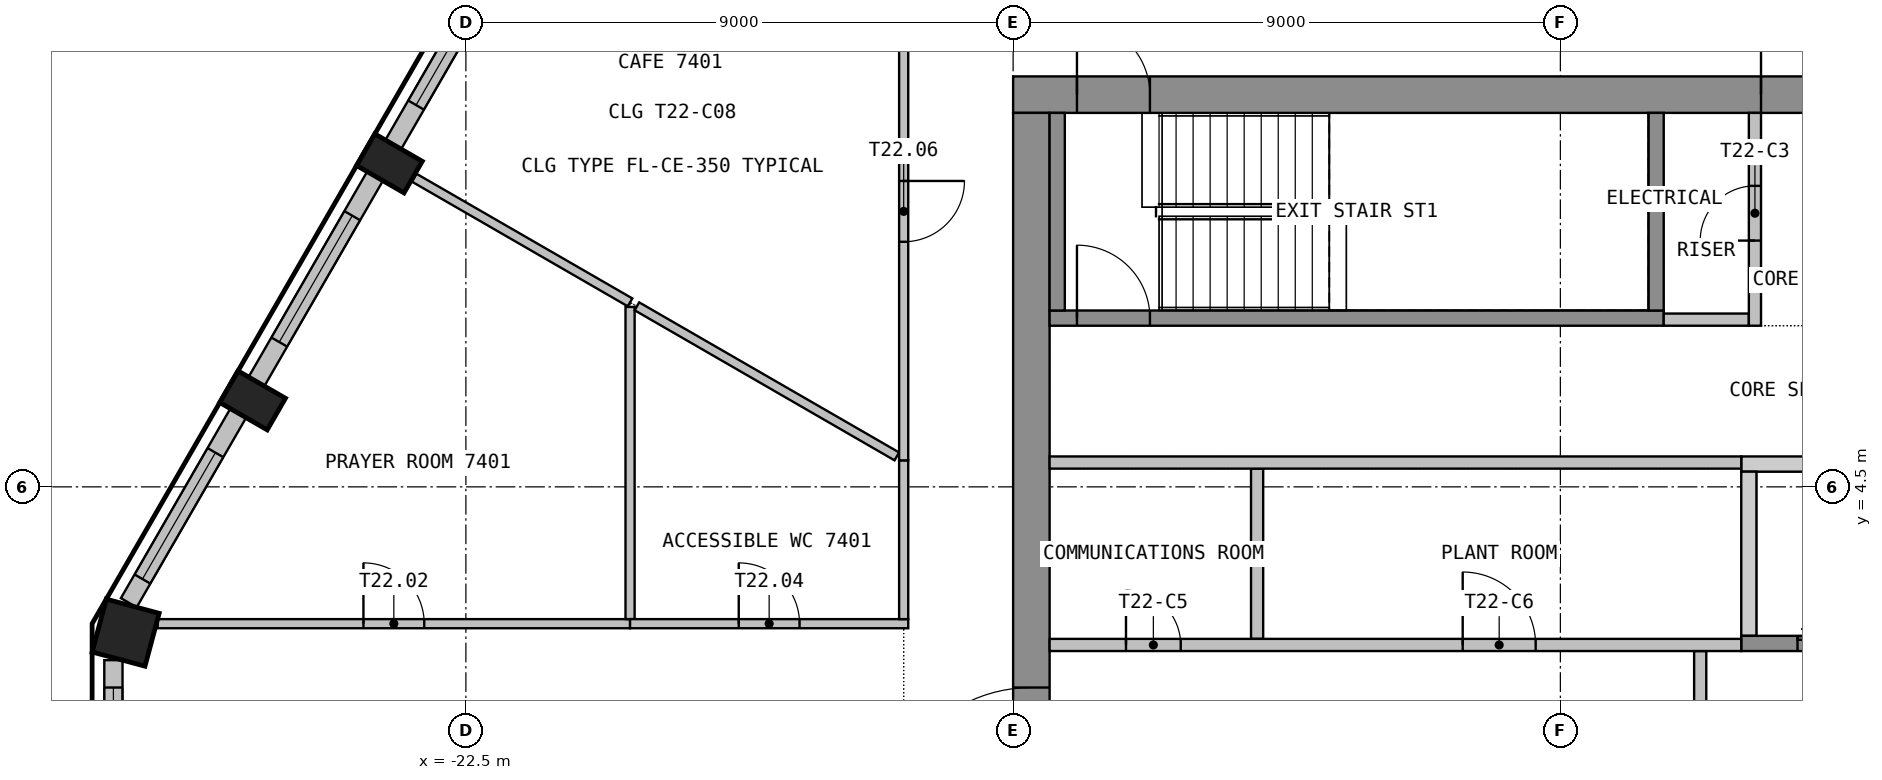
"""IFC4 building model, lengths in metres.
Left out: names, types, materials, properties, quantities, classifications, styles, units other than length and angle.
Written with IfcOpenShell. Run it as: python <this file> out.ifc"""

import sys

from ifc_helpers import new_model, si_unit, direction, frame, frame_2d, origin, origin_2d, place, context, subcontext, project, spatial, polyline, rectangle, outline, extrude, element, fill, save


model = new_model("IFC4")
c1 = context("Model", 3, precision=1e-05, world=origin(), true_north=direction((0.0, 1.0)))
c2 = subcontext(c1, "Body", "Model", "MODEL_VIEW")
j1 = project(units=[si_unit("LENGTHUNIT", "METRE"), si_unit("PLANEANGLEUNIT", "RADIAN")], contexts=[c1])
p1 = place(None, origin())
s1 = spatial("IfcSite", under=j1, at=p1, CompositionType="ELEMENT")
p2 = place(p1, origin())
s2 = spatial("IfcBuilding", under=s1, at=p2, CompositionType="ELEMENT")
p3 = place(p2, frame((0.0, 0.0, 298.2)))
s3 = spatial("IfcBuildingStorey", under=s2, at=p3, CompositionType="ELEMENT", Elevation=298.2)
for number, where, z_axis, x_axis in (
    (1, (-23.757, 9.819, 0.0), (0.0, 0.0, 1.0), (-0.5, -0.866, 0.0)),
    (2, (-26.007, 5.922, 0.0), (0.0, 0.0, 1.0), (-0.5, -0.866, 0.0)),
):
    element("IfcColumn", number, at=place(p3, frame(where, z_axis=z_axis, x_axis=x_axis)), inside=s3, PredefinedType="COLUMN", context=c2, shape_type="SweptSolid", body=[
        extrude(rectangle(XDim=0.6, YDim=0.9, at=origin_2d()), origin(), (0.0, 0.0, 1.0), 3.575),
    ])
p4 = place(p3, frame((-28.096, 2.102, 0.0), z_axis=(0.0, 0.0, 1.0), x_axis=(-0.258819045103, -0.965925826289, 0.0)))
e3 = element("IfcColumn", 3, at=p4, inside=s3, PredefinedType="COLUMN", context=c2, shape_type="SweptSolid", body=[
    extrude(rectangle(XDim=0.9, YDim=0.9, at=origin_2d()), origin(), (0.0, 0.0, 1.0), 3.575),
])
p5 = place(p3, frame((-21.744, 13.506, 0.0), z_axis=(0.0, 0.0, 1.0), x_axis=(-0.499984428715, -0.866034393683, 0.0)))
e4 = element("IfcWall", 4, at=p5, inside=s3, PredefinedType="SOLIDWALL", context=c2, shape_type="SweptSolid", body=[
    extrude(rectangle(XDim=3.899, YDim=0.3, at=frame_2d((1.949, 0.0))), origin(), (0.0, 0.0, 1.0), 3.575),
])
p6 = place(p5, frame((0.75, 0.0, 0.9)))
e5 = element("IfcOpeningElement", 5, at=p6, cuts=e4, PredefinedType="OPENING", context=c2, shape_type="SweptSolid", body=[
    extrude(rectangle(XDim=2.4, YDim=2.1, at=frame_2d((1.2, 1.05))), frame((0.0, 0.16, 0.0), z_axis=(0.0, -1.0, 0.0), x_axis=(1.0, 0.0, 0.0)), (0.0, 0.0, 1.0), 0.32),
])
p7 = place(p3, frame((-23.994, 9.609, 0.0), z_axis=(0.0, 0.0, 1.0), x_axis=(-0.500011542666, -0.866018739521, 0.0)))
e6 = element("IfcWall", 6, at=p7, inside=s3, PredefinedType="SOLIDWALL", context=c2, shape_type="SweptSolid", body=[
    extrude(rectangle(XDim=3.899, YDim=0.3, at=frame_2d((1.949, 0.0))), origin(), (0.0, 0.0, 1.0), 3.575),
])
p8 = place(p7, frame((0.75, 0.0, 0.9)))
e7 = element("IfcOpeningElement", 7, at=p8, cuts=e6, PredefinedType="OPENING", context=c2, shape_type="SweptSolid", body=[
    extrude(rectangle(XDim=2.4, YDim=2.1, at=frame_2d((1.2, 1.05))), frame((0.0, 0.16, 0.0), z_axis=(0.0, -1.0, 0.0), x_axis=(1.0, 0.0, 0.0)), (0.0, 0.0, 1.0), 0.32),
])
p9 = place(p3, frame((-26.244, 5.712, 0.0), z_axis=(0.0, 0.0, 1.0), x_axis=(-0.499969057507, -0.866043267704, 0.0)))
e8 = element("IfcWall", 8, at=p9, inside=s3, PredefinedType="SOLIDWALL", context=c2, shape_type="SweptSolid", body=[
    extrude(rectangle(XDim=3.599, YDim=0.3, at=frame_2d((1.8, 0.0))), origin(), (0.0, 0.0, 1.0), 3.575),
])
p10 = place(p9, frame((0.75, 0.0, 0.9)))
e9 = element("IfcOpeningElement", 9, at=p10, cuts=e8, PredefinedType="OPENING", context=c2, shape_type="SweptSolid", body=[
    extrude(rectangle(XDim=2.4, YDim=2.1, at=frame_2d((1.2, 1.05))), frame((0.0, 0.16, 0.0), z_axis=(0.0, -1.0, 0.0), x_axis=(1.0, 0.0, 0.0)), (0.0, 0.0, 1.0), 0.32),
])
p11 = place(p3, frame((-28.297, 1.65, 0.0), z_axis=(0.0, 0.0, 1.0), x_axis=(0.0, -1.0, 0.0)))
e10 = element("IfcWall", 10, at=p11, inside=s3, PredefinedType="SOLIDWALL", context=c2, shape_type="SweptSolid", body=[
    extrude(rectangle(XDim=3.3, YDim=0.3, at=frame_2d((1.65, 0.0))), origin(), (0.0, 0.0, 1.0), 3.575),
])
p12 = place(p11, frame((0.45, 0.0, 0.9)))
e11 = element("IfcOpeningElement", 11, at=p12, cuts=e10, PredefinedType="OPENING", context=c2, shape_type="SweptSolid", body=[
    extrude(rectangle(XDim=2.4, YDim=2.1, at=frame_2d((1.2, 1.05))), frame((0.0, 0.16, 0.0), z_axis=(0.0, -1.0, 0.0), x_axis=(1.0, 0.0, 0.0)), (0.0, 0.0, 1.0), 0.32),
])
p13 = place(p3, frame((-13.5, 10.95, 0.0), z_axis=(0.0, 0.0, 1.0), x_axis=(1.0, 0.0, 0.0)))
e12 = element("IfcWall", 12, at=p13, inside=s3, PredefinedType="SHEAR", context=c2, shape_type="SweptSolid", body=[
    extrude(rectangle(XDim=27.0, YDim=0.6, at=frame_2d((13.5, 0.0))), origin(), (0.0, 0.0, 1.0), 3.575),
])
p14 = place(p13, frame((12.3, 0.0, 0.0)))
e13 = element("IfcOpeningElement", 13, at=p14, cuts=e12, PredefinedType="OPENING", context=c2, shape_type="SweptSolid", body=[
    extrude(rectangle(XDim=2.4, YDim=2.1, at=frame_2d((1.2, 1.05))), frame((0.0, 0.31, 0.0), z_axis=(0.0, -1.0, 0.0), x_axis=(1.0, 0.0, 0.0)), (0.0, 0.0, 1.0), 0.62),
])
p15 = place(p13, frame((1.05, 0.0, 0.0)))
e14 = element("IfcOpeningElement", 14, at=p15, cuts=e12, PredefinedType="OPENING", context=c2, shape_type="SweptSolid", body=[
    extrude(rectangle(XDim=1.2, YDim=2.1, at=frame_2d((0.6, 1.05))), frame((0.0, 0.31, 0.0), z_axis=(0.0, -1.0, 0.0), x_axis=(1.0, 0.0, 0.0)), (0.0, 0.0, 1.0), 0.62),
])
p16 = place(p13, frame((24.75, 0.0, 0.0)))
e15 = element("IfcOpeningElement", 15, at=p16, cuts=e12, PredefinedType="OPENING", context=c2, shape_type="SweptSolid", body=[
    extrude(rectangle(XDim=1.2, YDim=2.1, at=frame_2d((0.6, 1.05))), frame((0.0, 0.31, 0.0), z_axis=(0.0, -1.0, 0.0), x_axis=(1.0, 0.0, 0.0)), (0.0, 0.0, 1.0), 0.62),
])
p17 = place(p3, frame((-13.2, -10.65, 0.0), z_axis=(0.0, 0.0, 1.0), x_axis=(0.0, 1.0, 0.0)))
e16 = element("IfcWall", 16, at=p17, inside=s3, PredefinedType="SHEAR", context=c2, shape_type="SweptSolid", body=[
    extrude(rectangle(XDim=21.3, YDim=0.6, at=frame_2d((10.65, 0.0))), origin(), (0.0, 0.0, 1.0), 3.575),
])
p18 = place(p17, frame((9.45, 0.0, 0.0)))
e17 = element("IfcOpeningElement", 17, at=p18, cuts=e16, PredefinedType="OPENING", context=c2, shape_type="SweptSolid", body=[
    extrude(rectangle(XDim=2.4, YDim=2.1, at=frame_2d((1.2, 1.05))), frame((0.0, 0.31, 0.0), z_axis=(0.0, -1.0, 0.0), x_axis=(1.0, 0.0, 0.0)), (0.0, 0.0, 1.0), 0.62),
])
p19 = place(p3, origin())
e18 = element("IfcWall", 18, at=p19, inside=s3, PredefinedType="SHEAR", context=c2, shape_type="SweptSolid", body=[
    extrude(outline(polyline([(-1.525, 4.75), (1.525, 4.75), (1.525, 5.0), (-1.525, 5.0), (-1.525, 4.75)])), origin(), (0.0, 0.0, 1.0), 3.575),
])
p20 = place(p3, origin())
e19 = element("IfcWall", 19, at=p20, inside=s3, PredefinedType="SHEAR", context=c2, shape_type="SweptSolid", body=[
    extrude(outline(polyline([(-1.525, 2.05), (-1.275, 2.05), (-1.275, 4.75), (-1.525, 4.75), (-1.525, 2.05)])), origin(), (0.0, 0.0, 1.0), 3.575),
])
p21 = place(p3, frame((-1.525, 1.925, 0.0), z_axis=(0.0, 0.0, 1.0), x_axis=(1.0, 0.0, 0.0)))
e20 = element("IfcWall", 20, at=p21, inside=s3, PredefinedType="SHEAR", context=c2, shape_type="SweptSolid", body=[
    extrude(rectangle(XDim=3.05, YDim=0.25, at=frame_2d((1.525, 0.0))), origin(), (0.0, 0.0, 1.0), 3.575),
])
p22 = place(p21, frame((0.925, 0.0, 0.0)))
e21 = element("IfcOpeningElement", 21, at=p22, cuts=e20, PredefinedType="OPENING", context=c2, shape_type="SweptSolid", body=[
    extrude(rectangle(XDim=1.2, YDim=2.1, at=frame_2d((0.6, 1.05))), frame((0.0, 0.135, 0.0), z_axis=(0.0, -1.0, 0.0), x_axis=(1.0, 0.0, 0.0)), (0.0, 0.0, 1.0), 0.27),
])
p23 = place(p3, frame((-2.2, -1.8, 0.0), z_axis=(0.0, 0.0, 1.0), x_axis=(0.0, 1.0, 0.0)))
e22 = element("IfcWall", 22, at=p23, inside=s3, PredefinedType="PARTITIONING", context=c2, shape_type="SweptSolid", body=[
    extrude(rectangle(XDim=3.6, YDim=0.2, at=frame_2d((1.8, 0.0))), origin(), (0.0, 0.0, 1.0), 3.575),
])
p24 = place(p23, frame((1.2, 0.0, 0.0)))
e23 = element("IfcOpeningElement", 23, at=p24, cuts=e22, PredefinedType="OPENING", context=c2, shape_type="SweptSolid", body=[
    extrude(rectangle(XDim=1.2, YDim=2.1, at=frame_2d((0.6, 1.05))), frame((0.0, 0.11, 0.0), z_axis=(0.0, -1.0, 0.0), x_axis=(1.0, 0.0, 0.0)), (0.0, 0.0, 1.0), 0.22),
])
p25 = place(p3, frame((-12.9, 7.275, 0.0), z_axis=(0.0, 0.0, 1.0), x_axis=(1.0, 0.0, 0.0)))
e24 = element("IfcWall", 24, at=p25, inside=s3, PredefinedType="SHEAR", context=c2, shape_type="SweptSolid", body=[
    extrude(rectangle(XDim=10.1, YDim=0.25, at=frame_2d((5.05, 0.0))), origin(), (0.0, 0.0, 1.0), 3.575),
])
p26 = place(p25, frame((0.45, 0.0, 0.0)))
e25 = element("IfcOpeningElement", 25, at=p26, cuts=e24, PredefinedType="OPENING", context=c2, shape_type="SweptSolid", body=[
    extrude(rectangle(XDim=1.2, YDim=2.1, at=frame_2d((0.6, 1.05))), frame((0.0, 0.135, 0.0), z_axis=(0.0, -1.0, 0.0), x_axis=(1.0, 0.0, 0.0)), (0.0, 0.0, 1.0), 0.27),
])
for number, where, z_axis, x_axis in (
    (26, (-12.775, 7.4, 0.0), (0.0, 0.0, 1.0), (0.0, 1.0, 0.0)),
    (27, (-2.925, 7.4, 0.0), (0.0, 0.0, 1.0), (0.0, 1.0, 0.0)),
):
    element("IfcWall", number, at=place(p3, frame(where, z_axis=z_axis, x_axis=x_axis)), inside=s3, PredefinedType="SHEAR", context=c2, shape_type="SweptSolid", body=[
        extrude(rectangle(XDim=3.25, YDim=0.25, at=frame_2d((1.625, 0.0))), origin(), (0.0, 0.0, 1.0), 3.575),
    ])
p27 = place(p3, frame((-2.8, 7.25, 0.0), z_axis=(0.0, 0.0, 1.0), x_axis=(1.0, 0.0, 0.0)))
e28 = element("IfcWall", 28, at=p27, inside=s3, PredefinedType="PARTITIONING", context=c2, shape_type="SweptSolid", body=[
    extrude(rectangle(XDim=1.4, YDim=0.2, at=frame_2d((0.7, 0.0))), origin(), (0.0, 0.0, 1.0), 3.575),
])
p28 = place(p3, frame((-1.3, 7.15, 0.0), z_axis=(0.0, 0.0, 1.0), x_axis=(0.0, 1.0, 0.0)))
e29 = element("IfcWall", 29, at=p28, inside=s3, PredefinedType="PARTITIONING", context=c2, shape_type="SweptSolid", body=[
    extrude(rectangle(XDim=3.5, YDim=0.2, at=frame_2d((1.75, 0.0))), origin(), (0.0, 0.0, 1.0), 3.575),
])
p29 = place(p28, frame((1.4, 0.0, 0.0)))
e30 = element("IfcOpeningElement", 30, at=p29, cuts=e29, PredefinedType="OPENING", context=c2, shape_type="SweptSolid", body=[
    extrude(rectangle(XDim=0.9, YDim=2.1, at=frame_2d((0.45, 1.05))), frame((0.0, 0.11, 0.0), z_axis=(0.0, -1.0, 0.0), x_axis=(1.0, 0.0, 0.0)), (0.0, 0.0, 1.0), 0.22),
])
p30 = place(p3, frame((-9.488, 2.0, 0.0), z_axis=(0.0, 0.0, 1.0), x_axis=(0.0, 1.0, 0.0)))
e31 = element("IfcWall", 31, at=p30, inside=s3, PredefinedType="PARTITIONING", context=c2, shape_type="SweptSolid", body=[
    extrude(rectangle(XDim=2.8, YDim=0.2, at=frame_2d((1.4, 0.0))), origin(), (0.0, 0.0, 1.0), 3.575),
])
p31 = place(p3, frame((-12.9, 1.9, 0.0), z_axis=(0.0, 0.0, 1.0), x_axis=(1.0, 0.0, 0.0)))
e32 = element("IfcWall", 32, at=p31, inside=s3, PredefinedType="PARTITIONING", context=c2, shape_type="SweptSolid", body=[
    extrude(rectangle(XDim=11.375, YDim=0.2, at=frame_2d((5.688, 0.0))), origin(), (0.0, 0.0, 1.0), 3.575),
])
p32 = place(p31, frame((1.256, 0.0, 0.0)))
e33 = element("IfcOpeningElement", 33, at=p32, cuts=e32, PredefinedType="OPENING", context=c2, shape_type="SweptSolid", body=[
    extrude(rectangle(XDim=0.9, YDim=2.1, at=frame_2d((0.45, 1.05))), frame((0.0, 0.11, 0.0), z_axis=(0.0, -1.0, 0.0), x_axis=(1.0, 0.0, 0.0)), (0.0, 0.0, 1.0), 0.22),
])
p33 = place(p31, frame((6.794, 0.0, 0.0)))
e34 = element("IfcOpeningElement", 34, at=p33, cuts=e32, PredefinedType="OPENING", context=c2, shape_type="SweptSolid", body=[
    extrude(rectangle(XDim=1.2, YDim=2.1, at=frame_2d((0.6, 1.05))), frame((0.0, 0.11, 0.0), z_axis=(0.0, -1.0, 0.0), x_axis=(1.0, 0.0, 0.0)), (0.0, 0.0, 1.0), 0.22),
])
p34 = place(p3, frame((-12.9, 4.9, 0.0), z_axis=(0.0, 0.0, 1.0), x_axis=(1.0, 0.0, 0.0)))
e35 = element("IfcWall", 35, at=p34, inside=s3, PredefinedType="PARTITIONING", context=c2, shape_type="SweptSolid", body=[
    extrude(rectangle(XDim=11.375, YDim=0.2, at=frame_2d((5.688, 0.0))), origin(), (0.0, 0.0, 1.0), 3.575),
])
p35 = place(p3, frame((-27.57, 2.25, 0.0), z_axis=(0.0, 0.0, 1.0), x_axis=(1.0, 0.0, 0.0)))
e36 = element("IfcWall", 36, at=p35, inside=s3, PredefinedType="PARTITIONING", context=c2, shape_type="SweptSolid", body=[
    extrude(rectangle(XDim=7.77, YDim=0.15, at=frame_2d((3.885, 0.0))), origin(), (0.0, 0.0, 1.0), 3.575),
])
p36 = place(p35, frame((3.385, 0.0, 0.0)))
e37 = element("IfcOpeningElement", 37, at=p36, cuts=e36, PredefinedType="OPENING", context=c2, shape_type="SweptSolid", body=[
    extrude(rectangle(XDim=1.0, YDim=2.1, at=frame_2d((0.5, 1.05))), frame((0.0, 0.085, 0.0), z_axis=(0.0, -1.0, 0.0), x_axis=(1.0, 0.0, 0.0)), (0.0, 0.0, 1.0), 0.17),
])
p37 = place(p3, frame((-23.35, 9.584, 0.0), z_axis=(0.0, 0.0, 1.0), x_axis=(0.865995170514, -0.500052361904, 0.0)))
e38 = element("IfcWall", 38, at=p37, inside=s3, PredefinedType="PARTITIONING", context=c2, shape_type="SweptSolid", body=[
    extrude(rectangle(XDim=4.1, YDim=0.15, at=frame_2d((2.05, 0.0))), origin(), (0.0, 0.0, 1.0), 3.575),
])
p38 = place(p3, frame((-19.8, 7.459, 0.0), z_axis=(0.0, 0.0, 1.0), x_axis=(0.0, -1.0, 0.0)))
e39 = element("IfcWall", 39, at=p38, inside=s3, PredefinedType="PARTITIONING", context=c2, shape_type="SweptSolid", body=[
    extrude(rectangle(XDim=5.134, YDim=0.15, at=frame_2d((2.567, 0.0))), origin(), (0.0, 0.0, 1.0), 3.575),
])
p39 = place(p3, frame((-19.8, 2.25, 0.0), z_axis=(0.0, 0.0, 1.0), x_axis=(1.0, 0.0, 0.0)))
e40 = element("IfcWall", 40, at=p39, inside=s3, PredefinedType="PARTITIONING", context=c2, shape_type="SweptSolid", body=[
    extrude(rectangle(XDim=4.575, YDim=0.15, at=frame_2d((2.288, 0.0))), origin(), (0.0, 0.0, 1.0), 3.575),
])
p40 = place(p39, frame((1.788, 0.0, 0.0)))
e41 = element("IfcOpeningElement", 41, at=p40, cuts=e40, PredefinedType="OPENING", context=c2, shape_type="SweptSolid", body=[
    extrude(rectangle(XDim=1.0, YDim=2.1, at=frame_2d((0.5, 1.05))), frame((0.0, 0.085, 0.0), z_axis=(0.0, -1.0, 0.0), x_axis=(1.0, 0.0, 0.0)), (0.0, 0.0, 1.0), 0.17),
])
p41 = place(p3, frame((-19.688, 7.469, 0.0), z_axis=(0.0, 0.0, 1.0), x_axis=(0.866034039096, -0.499985042903, 0.0)))
e42 = element("IfcWall", 42, at=p41, inside=s3, PredefinedType="PARTITIONING", context=c2, shape_type="SweptSolid", body=[
    extrude(rectangle(XDim=4.936, YDim=0.15, at=frame_2d((2.468, 0.0))), origin(), (0.0, 0.0, 1.0), 3.575),
])
p42 = place(p3, frame((-15.3, 4.936, 0.0), z_axis=(0.0, 0.0, 1.0), x_axis=(0.0, -1.0, 0.0)))
e43 = element("IfcWall", 43, at=p42, inside=s3, PredefinedType="PARTITIONING", context=c2, shape_type="SweptSolid", body=[
    extrude(rectangle(XDim=2.611, YDim=0.15, at=frame_2d((1.306, 0.0))), origin(), (0.0, 0.0, 1.0), 3.575),
])
p43 = place(p3, frame((-15.3, 13.125, 0.0), z_axis=(0.0, 0.0, 1.0), x_axis=(0.0, -1.0, 0.0)))
e44 = element("IfcWall", 44, at=p43, inside=s3, PredefinedType="PARTITIONING", context=c2, shape_type="SweptSolid", body=[
    extrude(rectangle(XDim=8.189, YDim=0.15, at=frame_2d((4.094, 0.0))), origin(), (0.0, 0.0, 1.0), 3.575),
])
p44 = place(p43, frame((3.594, 0.0, 0.0)))
e45 = element("IfcOpeningElement", 45, at=p44, cuts=e44, PredefinedType="OPENING", context=c2, shape_type="SweptSolid", body=[
    extrude(rectangle(XDim=1.0, YDim=2.1, at=frame_2d((0.5, 1.05))), frame((0.0, 0.085, 0.0), z_axis=(0.0, -1.0, 0.0), x_axis=(1.0, 0.0, 0.0)), (0.0, 0.0, 1.0), 0.17),
])
p45 = place(p6, origin())
e46 = element("IfcWindow", 46, at=p45, inside=s3, PartitioningType="SINGLE_PANEL", PredefinedType="WINDOW", context=c2, shape_type="SweptSolid", body=[
    extrude(rectangle(XDim=2.4, YDim=2.1, at=frame_2d((1.2, 1.05))), frame((0.0, 0.03, 0.0), z_axis=(0.0, -1.0, 0.0), x_axis=(1.0, 0.0, 0.0)), (0.0, 0.0, 1.0), 0.06),
])
fill(e5, e46)
p46 = place(p8, origin())
e47 = element("IfcWindow", 47, at=p46, inside=s3, PartitioningType="SINGLE_PANEL", PredefinedType="WINDOW", context=c2, shape_type="SweptSolid", body=[
    extrude(rectangle(XDim=2.4, YDim=2.1, at=frame_2d((1.2, 1.05))), frame((0.0, 0.03, 0.0), z_axis=(0.0, -1.0, 0.0), x_axis=(1.0, 0.0, 0.0)), (0.0, 0.0, 1.0), 0.06),
])
fill(e7, e47)
p47 = place(p10, origin())
e48 = element("IfcWindow", 48, at=p47, inside=s3, PartitioningType="SINGLE_PANEL", PredefinedType="WINDOW", context=c2, shape_type="SweptSolid", body=[
    extrude(rectangle(XDim=2.4, YDim=2.1, at=frame_2d((1.2, 1.05))), frame((0.0, 0.03, 0.0), z_axis=(0.0, -1.0, 0.0), x_axis=(1.0, 0.0, 0.0)), (0.0, 0.0, 1.0), 0.06),
])
fill(e9, e48)
p48 = place(p12, origin())
e49 = element("IfcWindow", 49, at=p48, inside=s3, PartitioningType="SINGLE_PANEL", PredefinedType="WINDOW", context=c2, shape_type="SweptSolid", body=[
    extrude(rectangle(XDim=2.4, YDim=2.1, at=frame_2d((1.2, 1.05))), frame((0.0, 0.03, 0.0), z_axis=(0.0, -1.0, 0.0), x_axis=(1.0, 0.0, 0.0)), (0.0, 0.0, 1.0), 0.06),
])
fill(e11, e49)
p49 = place(p18, origin())
e50 = element("IfcDoor", 50, at=p49, inside=s3, OperationType="DOUBLE_DOOR_DOUBLE_SWING", PredefinedType="DOOR", context=c2, shape_type="SweptSolid", body=[
    extrude(rectangle(XDim=2.4, YDim=2.1, at=frame_2d((1.2, 1.05))), frame((0.0, 0.025, 0.0), z_axis=(0.0, -1.0, 0.0), x_axis=(1.0, 0.0, 0.0)), (0.0, 0.0, 1.0), 0.05),
])
fill(e17, e50)
p50 = place(p14, origin())
e51 = element("IfcDoor", 51, at=p50, inside=s3, OperationType="DOUBLE_DOOR_DOUBLE_SWING", PredefinedType="DOOR", context=c2, shape_type="SweptSolid", body=[
    extrude(rectangle(XDim=2.4, YDim=2.1, at=frame_2d((1.2, 1.05))), frame((0.0, 0.025, 0.0), z_axis=(0.0, -1.0, 0.0), x_axis=(1.0, 0.0, 0.0)), (0.0, 0.0, 1.0), 0.05),
])
fill(e13, e51)
p51 = place(p15, origin())
e52 = element("IfcDoor", 52, at=p51, inside=s3, OperationType="SINGLE_SWING_RIGHT", PredefinedType="DOOR", context=c2, shape_type="SweptSolid", body=[
    extrude(rectangle(XDim=1.2, YDim=2.1, at=frame_2d((0.6, 1.05))), frame((0.0, 0.025, 0.0), z_axis=(0.0, -1.0, 0.0), x_axis=(1.0, 0.0, 0.0)), (0.0, 0.0, 1.0), 0.05),
])
fill(e14, e52)
p52 = place(p22, origin())
e53 = element("IfcDoor", 53, at=p52, inside=s3, OperationType="DOUBLE_DOOR_SLIDING", PredefinedType="DOOR", context=c2, shape_type="SweptSolid", body=[
    extrude(rectangle(XDim=1.2, YDim=2.1, at=frame_2d((0.6, 1.05))), frame((0.0, 0.025, 0.0), z_axis=(0.0, -1.0, 0.0), x_axis=(1.0, 0.0, 0.0)), (0.0, 0.0, 1.0), 0.05),
])
fill(e21, e53)
p53 = place(p26, origin())
e54 = element("IfcDoor", 54, at=p53, inside=s3, OperationType="SINGLE_SWING_LEFT", PredefinedType="DOOR", context=c2, shape_type="SweptSolid", body=[
    extrude(rectangle(XDim=1.2, YDim=2.1, at=frame_2d((0.6, 1.05))), frame((0.0, 0.025, 0.0), z_axis=(0.0, -1.0, 0.0), x_axis=(1.0, 0.0, 0.0)), (0.0, 0.0, 1.0), 0.05),
])
fill(e25, e54)
p54 = place(p29, origin())
e55 = element("IfcDoor", 55, at=p54, inside=s3, OperationType="SINGLE_SWING_LEFT", PredefinedType="DOOR", context=c2, shape_type="SweptSolid", body=[
    extrude(rectangle(XDim=0.9, YDim=2.1, at=frame_2d((0.45, 1.05))), frame((0.0, 0.025, 0.0), z_axis=(0.0, -1.0, 0.0), x_axis=(1.0, 0.0, 0.0)), (0.0, 0.0, 1.0), 0.05),
])
fill(e30, e55)
p55 = place(p32, origin())
e56 = element("IfcDoor", 56, at=p55, inside=s3, OperationType="SINGLE_SWING_LEFT", PredefinedType="DOOR", context=c2, shape_type="SweptSolid", body=[
    extrude(rectangle(XDim=0.9, YDim=2.1, at=frame_2d((0.45, 1.05))), frame((0.0, 0.025, 0.0), z_axis=(0.0, -1.0, 0.0), x_axis=(1.0, 0.0, 0.0)), (0.0, 0.0, 1.0), 0.05),
])
fill(e33, e56)
p56 = place(p33, origin())
e57 = element("IfcDoor", 57, at=p56, inside=s3, OperationType="SINGLE_SWING_RIGHT", PredefinedType="DOOR", context=c2, shape_type="SweptSolid", body=[
    extrude(rectangle(XDim=1.2, YDim=2.1, at=frame_2d((0.6, 1.05))), frame((0.0, 0.025, 0.0), z_axis=(0.0, -1.0, 0.0), x_axis=(1.0, 0.0, 0.0)), (0.0, 0.0, 1.0), 0.05),
])
fill(e34, e57)
p57 = place(p36, origin())
e58 = element("IfcDoor", 58, at=p57, inside=s3, OperationType="SINGLE_SWING_RIGHT", PredefinedType="DOOR", context=c2, shape_type="SweptSolid", body=[
    extrude(rectangle(XDim=1.0, YDim=2.1, at=frame_2d((0.5, 1.05))), frame((0.0, 0.025, 0.0), z_axis=(0.0, -1.0, 0.0), x_axis=(1.0, 0.0, 0.0)), (0.0, 0.0, 1.0), 0.05),
])
fill(e37, e58)
p58 = place(p40, origin())
e59 = element("IfcDoor", 59, at=p58, inside=s3, OperationType="SINGLE_SWING_RIGHT", PredefinedType="DOOR", context=c2, shape_type="SweptSolid", body=[
    extrude(rectangle(XDim=1.0, YDim=2.1, at=frame_2d((0.5, 1.05))), frame((0.0, 0.025, 0.0), z_axis=(0.0, -1.0, 0.0), x_axis=(1.0, 0.0, 0.0)), (0.0, 0.0, 1.0), 0.05),
])
fill(e41, e59)
p59 = place(p44, origin())
e60 = element("IfcDoor", 60, at=p59, inside=s3, OperationType="SINGLE_SWING_LEFT", PredefinedType="DOOR", context=c2, shape_type="SweptSolid", body=[
    extrude(rectangle(XDim=1.0, YDim=2.1, at=frame_2d((0.5, 1.05))), frame((0.0, 0.025, 0.0), z_axis=(0.0, -1.0, 0.0), x_axis=(1.0, 0.0, 0.0)), (0.0, 0.0, 1.0), 0.05),
])
fill(e45, e60)
save(model, sys.argv[1])
